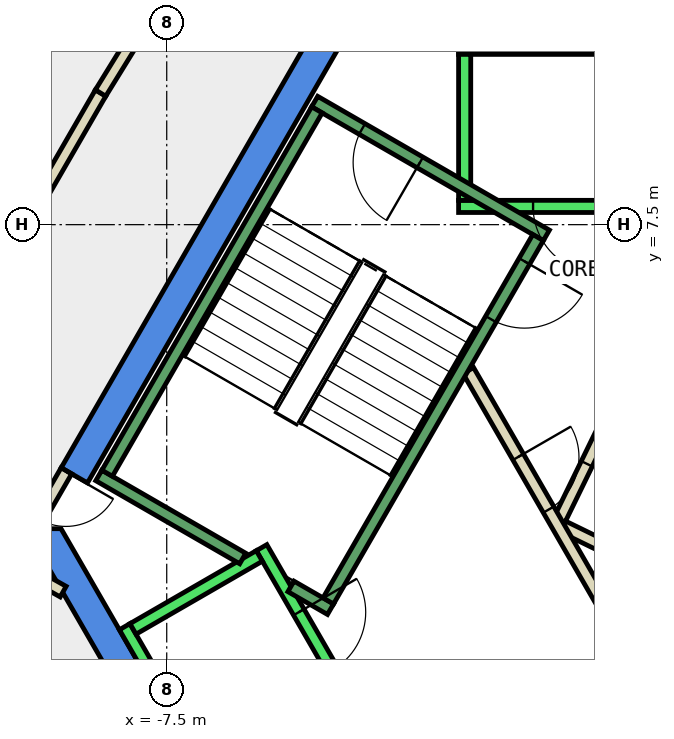
"""IFC4 building model, lengths in metres.
Left out: names, types, materials, properties, quantities, classifications, styles, units other than length and angle.
Written with IfcOpenShell. Run it as: python <this file> out.ifc"""

import sys

from ifc_helpers import new_model, si_unit, direction, frame, frame_2d, origin, place, context, subcontext, project, spatial, polyline, rectangle, outline, extrude, element, fill, save


model = new_model("IFC4")
c1 = context("Model", 3, precision=1e-05, world=origin(), true_north=direction((0.0, 1.0)))
c2 = subcontext(c1, "Body", "Model", "MODEL_VIEW")
j1 = project(units=[si_unit("LENGTHUNIT", "METRE"), si_unit("PLANEANGLEUNIT", "RADIAN")], contexts=[c1])
p1 = place(None, origin())
s1 = spatial("IfcSite", under=j1, at=p1, CompositionType="ELEMENT")
p2 = place(p1, origin())
s2 = spatial("IfcBuilding", under=s1, at=p2, CompositionType="ELEMENT")
p3 = place(p2, frame((0.0, 0.0, 308.0)))
s3 = spatial("IfcBuildingStorey", under=s2, at=p3, CompositionType="ELEMENT", Elevation=308.0)
p4 = place(p3, frame((0.0, 0.0, -0.34)))
e1 = element("IfcWall", 1, at=p4, inside=s3, PredefinedType="SHEAR", context=c2, shape_type="SweptSolid", body=[
    extrude(outline(polyline([(-9.236, 3.502), (-8.803, 3.253), (-4.619, 10.5), (-4.907, 11.0), (-9.236, 3.502)])), origin(), (0.0, 0.0, 1.0), 3.6),
])
p5 = place(p3, frame((0.0, 0.0, -0.34)))
e2 = element("IfcWall", 2, at=p5, inside=s3, PredefinedType="SHEAR", context=c2, shape_type="SweptSolid", body=[
    extrude(outline(polyline([(-9.815, 2.5), (-4.907, -6.0), (-4.619, -5.5), (-9.238, 2.5), (-9.815, 2.5)])), origin(), (0.0, 0.0, 1.0), 3.6),
])
p6 = place(p3, frame((0.285, 5.365, 0.0), z_axis=(0.0, 0.0, 1.0), x_axis=(-0.43840190643, -0.898779043168, 0.0)))
e3 = element("IfcWall", 3, at=p6, inside=s3, PredefinedType="PARTITIONING", context=c2, shape_type="SweptSolid", body=[
    extrude(rectangle(XDim=3.1, YDim=0.2, at=frame_2d((1.55, 0.0))), origin(), (0.0, 0.0, 1.0), 3.26),
])
p7 = place(p6, frame((1.1, 0.0, 0.0)))
e4 = element("IfcOpeningElement", 4, at=p7, cuts=e3, PredefinedType="OPENING", context=c2, shape_type="SweptSolid", body=[
    extrude(rectangle(XDim=0.9, YDim=2.1, at=frame_2d((0.45, 1.05))), frame((0.0, 0.11, 0.0), z_axis=(0.0, -1.0, 0.0), x_axis=(1.0, 0.0, 0.0)), (0.0, 0.0, 1.0), 0.22),
])
p8 = place(p3, frame((-0.984, 2.535, 0.0), z_axis=(0.0, 0.0, 1.0), x_axis=(0.898707583217, -0.438548378025, 0.0)))
e5 = element("IfcWall", 5, at=p8, inside=s3, PredefinedType="PARTITIONING", context=c2, shape_type="SweptSolid", body=[
    extrude(rectangle(XDim=1.774, YDim=0.2, at=frame_2d((0.887, 0.0))), origin(), (0.0, 0.0, 1.0), 3.26),
])
p9 = place(p3, frame((-9.203, 1.465, 0.0), z_axis=(0.0, 0.0, 1.0), x_axis=(-0.872341127106, 0.488897696823, 0.0)))
e6 = element("IfcWall", 6, at=p9, inside=s3, PredefinedType="PARTITIONING", context=c2, shape_type="SweptSolid", body=[
    extrude(rectangle(XDim=1.667, YDim=0.2, at=frame_2d((0.833, 0.0))), origin(), (0.0, 0.0, 1.0), 3.26),
])
p10 = place(p3, frame((-12.701, 2.54, 0.0), z_axis=(0.0, 0.0, 1.0), x_axis=(0.499946799636, 0.86605611685, 0.0)))
e7 = element("IfcWall", 7, at=p10, inside=s3, PredefinedType="PARTITIONING", context=c2, shape_type="SweptSolid", body=[
    extrude(rectangle(XDim=8.227, YDim=0.2, at=frame_2d((4.114, 0.0))), origin(), (0.0, 0.0, 1.0), 3.26),
])
p11 = place(p10, frame((3.613, 0.0, 0.0)))
e8 = element("IfcOpeningElement", 8, at=p11, cuts=e7, PredefinedType="OPENING", context=c2, shape_type="SweptSolid", body=[
    extrude(rectangle(XDim=1.0, YDim=2.1, at=frame_2d((0.5, 1.05))), frame((0.0, 0.11, 0.0), z_axis=(0.0, -1.0, 0.0), x_axis=(1.0, 0.0, 0.0)), (0.0, 0.0, 1.0), 0.22),
])
p12 = place(p3, frame((-8.588, 9.665, 0.0), z_axis=(0.0, 0.0, 1.0), x_axis=(0.525142215688, 0.851014484778, 0.0)))
e9 = element("IfcWall", 9, at=p12, inside=s3, PredefinedType="PARTITIONING", context=c2, shape_type="SweptSolid", body=[
    extrude(rectangle(XDim=7.872, YDim=0.2, at=frame_2d((3.936, 0.0))), origin(), (0.0, 0.0, 1.0), 3.26),
])
p13 = place(p3, frame((-0.982, -1.0, 0.0), z_axis=(0.0, 0.0, 1.0), x_axis=(0.50024047865, 0.865886518847, 0.0)))
e10 = element("IfcWall", 10, at=p13, inside=s3, PredefinedType="PARTITIONING", context=c2, shape_type="SweptSolid", body=[
    extrude(rectangle(XDim=1.863, YDim=0.2, at=frame_2d((0.931, 0.0))), origin(), (0.0, 0.0, 1.0), 3.26),
])
p14 = place(p3, frame((-2.54, 5.1, 0.0), z_axis=(0.0, 0.0, 1.0), x_axis=(0.499925051871, -0.866068670783, 0.0)))
e11 = element("IfcWall", 11, at=p14, inside=s3, PredefinedType="PARTITIONING", context=c2, shape_type="SweptSolid", body=[
    extrude(rectangle(XDim=5.181, YDim=0.2, at=frame_2d((2.59, 0.0))), origin(), (0.0, 0.0, 1.0), 3.26),
])
p15 = place(p14, frame((1.64, 0.0, 0.0)))
e12 = element("IfcOpeningElement", 12, at=p15, cuts=e11, PredefinedType="OPENING", context=c2, shape_type="SweptSolid", body=[
    extrude(rectangle(XDim=1.0, YDim=2.1, at=frame_2d((0.5, 1.05))), frame((0.0, 0.11, 0.0), z_axis=(0.0, -1.0, 0.0), x_axis=(1.0, 0.0, 0.0)), (0.0, 0.0, 1.0), 0.22),
])
p16 = place(p3, frame((-9.15, 3.452, 0.0), z_axis=(0.0, 0.0, 1.0), x_axis=(-0.500079945886, -0.865979242085, 0.0)))
e13 = element("IfcWall", 13, at=p16, inside=s3, PredefinedType="PARTITIONING", context=c2, shape_type="SweptSolid", body=[
    extrude(rectangle(XDim=0.926, YDim=0.2, at=frame_2d((0.463, 0.0))), origin(), (0.0, 0.0, 1.0), 2.4),
])
p17 = place(p16, frame((0.017, 0.0, 0.0)))
e14 = element("IfcOpeningElement", 14, at=p17, cuts=e13, PredefinedType="OPENING", context=c2, shape_type="SweptSolid", body=[
    extrude(rectangle(XDim=0.9, YDim=2.1, at=frame_2d((0.45, 1.05))), frame((0.0, 0.11, 0.0), z_axis=(0.0, -1.0, 0.0), x_axis=(1.0, 0.0, 0.0)), (0.0, 0.0, 1.0), 0.22),
])
p18 = place(p3, frame((2.7, 7.8, 0.0), z_axis=(0.0, 0.0, 1.0), x_axis=(-1.0, 0.0, 0.0)))
e15 = element("IfcWall", 15, at=p18, inside=s3, PredefinedType="STANDARD", context=c2, shape_type="SweptSolid", body=[
    extrude(rectangle(XDim=5.4, YDim=0.2, at=frame_2d((2.7, 0.0))), origin(), (0.0, 0.0, 1.0), 3.26),
])
p19 = place(p18, frame((1.225, 0.0, 0.0)))
e16 = element("IfcOpeningElement", 16, at=p19, cuts=e15, PredefinedType="OPENING", context=c2, shape_type="SweptSolid", body=[
    extrude(rectangle(XDim=1.1, YDim=2.1, at=frame_2d((0.55, 1.05))), frame((0.0, 0.11, 0.0), z_axis=(0.0, -1.0, 0.0), x_axis=(1.0, 0.0, 0.0)), (0.0, 0.0, 1.0), 0.22),
])
p20 = place(p18, frame((3.075, 0.0, 0.0)))
e17 = element("IfcOpeningElement", 17, at=p20, cuts=e15, PredefinedType="OPENING", context=c2, shape_type="SweptSolid", body=[
    extrude(rectangle(XDim=1.1, YDim=2.1, at=frame_2d((0.55, 1.05))), frame((0.0, 0.11, 0.0), z_axis=(0.0, -1.0, 0.0), x_axis=(1.0, 0.0, 0.0)), (0.0, 0.0, 1.0), 0.22),
])
p21 = place(p3, frame((2.7, 10.4, 0.0), z_axis=(0.0, 0.0, 1.0), x_axis=(-1.0, 0.0, 0.0)))
e18 = element("IfcWall", 18, at=p21, inside=s3, PredefinedType="STANDARD", context=c2, shape_type="SweptSolid", body=[
    extrude(rectangle(XDim=5.4, YDim=0.2, at=frame_2d((2.7, 0.0))), origin(), (0.0, 0.0, 1.0), 3.26),
])
p22 = place(p3, frame((-2.6, 7.9, 0.0), z_axis=(0.0, 0.0, 1.0), x_axis=(0.0, 1.0, 0.0)))
e19 = element("IfcWall", 19, at=p22, inside=s3, PredefinedType="STANDARD", context=c2, shape_type="SweptSolid", body=[
    extrude(rectangle(XDim=2.4, YDim=0.2, at=frame_2d((1.2, 0.0))), origin(), (0.0, 0.0, 1.0), 3.26),
])
p23 = place(p3, frame((-5.94, 2.188, 0.0), z_axis=(0.0, 0.0, 1.0), x_axis=(0.500034260056, -0.866005622828, 0.0)))
e20 = element("IfcWall", 20, at=p23, inside=s3, PredefinedType="STANDARD", context=c2, shape_type="SweptSolid", body=[
    extrude(rectangle(XDim=5.399, YDim=0.2, at=frame_2d((2.7, 0.0))), origin(), (0.0, 0.0, 1.0), 3.26),
])
p24 = place(p23, frame((3.075, 0.0, 0.0)))
e21 = element("IfcOpeningElement", 21, at=p24, cuts=e20, PredefinedType="OPENING", context=c2, shape_type="SweptSolid", body=[
    extrude(rectangle(XDim=1.1, YDim=2.1, at=frame_2d((0.55, 1.05))), frame((0.0, 0.11, 0.0), z_axis=(0.0, -1.0, 0.0), x_axis=(1.0, 0.0, 0.0)), (0.0, 0.0, 1.0), 0.22),
])
p25 = place(p23, frame((1.225, 0.0, 0.0)))
e22 = element("IfcOpeningElement", 22, at=p25, cuts=e20, PredefinedType="OPENING", context=c2, shape_type="SweptSolid", body=[
    extrude(rectangle(XDim=1.1, YDim=2.1, at=frame_2d((0.55, 1.05))), frame((0.0, 0.11, 0.0), z_axis=(0.0, -1.0, 0.0), x_axis=(1.0, 0.0, 0.0)), (0.0, 0.0, 1.0), 0.22),
])
p26 = place(p3, frame((-8.192, 0.888, 0.0), z_axis=(0.0, 0.0, 1.0), x_axis=(0.500034260056, -0.866005622828, 0.0)))
e23 = element("IfcWall", 23, at=p26, inside=s3, PredefinedType="STANDARD", context=c2, shape_type="SweptSolid", body=[
    extrude(rectangle(XDim=5.399, YDim=0.2, at=frame_2d((2.7, 0.0))), origin(), (0.0, 0.0, 1.0), 3.26),
])
p27 = place(p3, frame((-5.977, 2.052, 0.0), z_axis=(0.0, 0.0, 1.0), x_axis=(-0.865973769406, -0.500089422704, 0.0)))
e24 = element("IfcWall", 24, at=p27, inside=s3, PredefinedType="STANDARD", context=c2, shape_type="SweptSolid", body=[
    extrude(rectangle(XDim=2.399, YDim=0.2, at=frame_2d((1.2, 0.0))), origin(), (0.0, 0.0, 1.0), 3.26),
])
p28 = place(p3, frame((-1.256, 7.324, 0.0), z_axis=(0.0, 0.0, 1.0), x_axis=(-0.866046073146, 0.499964197906, 0.0)))
e25 = element("IfcWall", 25, at=p28, inside=s3, PredefinedType="STANDARD", context=c2, shape_type="SweptSolid", body=[
    extrude(rectangle(XDim=4.4, YDim=0.2, at=frame_2d((2.2, 0.0))), origin(), (0.0, 0.0, 1.0), 3.26),
])
p29 = place(p28, frame((2.4, 0.0, 0.0)))
e26 = element("IfcOpeningElement", 26, at=p29, cuts=e25, PredefinedType="OPENING", context=c2, shape_type="SweptSolid", body=[
    extrude(rectangle(XDim=1.1, YDim=2.2, at=frame_2d((0.55, 1.1))), frame((0.0, 0.11, 0.0), z_axis=(0.0, -1.0, 0.0), x_axis=(1.0, 0.0, 0.0)), (0.0, 0.0, 1.0), 0.22),
])
p30 = place(p3, frame((-6.25, 2.01, 0.0), z_axis=(0.0, 0.0, 1.0), x_axis=(-0.86611865017, 0.499838457731, 0.0)))
e27 = element("IfcWall", 27, at=p30, inside=s3, PredefinedType="STANDARD", context=c2, shape_type="SweptSolid", body=[
    extrude(rectangle(XDim=2.733, YDim=0.2, at=frame_2d((1.366, 0.0))), origin(), (0.0, 0.0, 1.0), 3.26),
])
p31 = place(p3, frame((-4.806, 1.176, 0.0), z_axis=(0.0, 0.0, 1.0), x_axis=(-0.866558586415, 0.499075361355, 0.0)))
e28 = element("IfcWall", 28, at=p31, inside=s3, PredefinedType="STANDARD", context=c2, shape_type="SweptSolid", body=[
    extrude(rectangle(XDim=0.751, YDim=0.2, at=frame_2d((0.376, 0.0))), origin(), (0.0, 0.0, 1.0), 3.26),
])
p32 = place(p3, frame((-1.393, 7.288, 0.0), z_axis=(0.0, 0.0, 1.0), x_axis=(-0.499963383562, -0.866046543262, 0.0)))
e29 = element("IfcWall", 29, at=p32, inside=s3, PredefinedType="STANDARD", context=c2, shape_type="SweptSolid", body=[
    extrude(rectangle(XDim=6.9, YDim=0.2, at=frame_2d((3.45, 0.0))), origin(), (0.0, 0.0, 1.0), 3.26),
])
p33 = place(p32, frame((0.45, 0.0, 0.0)))
e30 = element("IfcOpeningElement", 30, at=p33, cuts=e29, PredefinedType="OPENING", context=c2, shape_type="SweptSolid", body=[
    extrude(rectangle(XDim=1.1, YDim=2.2, at=frame_2d((0.55, 1.1))), frame((0.0, 0.11, 0.0), z_axis=(0.0, -1.0, 0.0), x_axis=(1.0, 0.0, 0.0)), (0.0, 0.0, 1.0), 0.22),
])
p34 = place(p3, frame((-5.03, 9.388, 0.0), z_axis=(0.0, 0.0, 1.0), x_axis=(-0.499978703459, -0.866037698999, 0.0)))
e31 = element("IfcWall", 31, at=p34, inside=s3, PredefinedType="STANDARD", context=c2, shape_type="SweptSolid", body=[
    extrude(rectangle(XDim=6.9, YDim=0.2, at=frame_2d((3.45, 0.0))), origin(), (0.0, 0.0, 1.0), 3.26),
])
p35 = place(p15, origin())
e32 = element("IfcDoor", 32, at=p35, inside=s3, OperationType="SINGLE_SWING_RIGHT", PredefinedType="DOOR", context=c2, shape_type="SweptSolid", body=[
    extrude(rectangle(XDim=1.0, YDim=2.1, at=frame_2d((0.5, 1.05))), frame((0.0, 0.025, 0.0), z_axis=(0.0, -1.0, 0.0), x_axis=(1.0, 0.0, 0.0)), (0.0, 0.0, 1.0), 0.05),
])
fill(e12, e32)
p36 = place(p7, origin())
e33 = element("IfcDoor", 33, at=p36, inside=s3, OperationType="SINGLE_SWING_RIGHT", PredefinedType="DOOR", context=c2, shape_type="SweptSolid", body=[
    extrude(rectangle(XDim=0.9, YDim=2.1, at=frame_2d((0.45, 1.05))), frame((0.0, 0.025, 0.0), z_axis=(0.0, -1.0, 0.0), x_axis=(1.0, 0.0, 0.0)), (0.0, 0.0, 1.0), 0.05),
])
fill(e4, e33)
p37 = place(p17, origin())
e34 = element("IfcDoor", 34, at=p37, inside=s3, OperationType="SINGLE_SWING_LEFT", PredefinedType="DOOR", context=c2, shape_type="SweptSolid", body=[
    extrude(rectangle(XDim=0.9, YDim=2.1, at=frame_2d((0.45, 1.05))), frame((0.0, 0.025, 0.0), z_axis=(0.0, -1.0, 0.0), x_axis=(1.0, 0.0, 0.0)), (0.0, 0.0, 1.0), 0.05),
])
fill(e14, e34)
p38 = place(p20, origin())
e35 = element("IfcDoor", 35, at=p38, inside=s3, OperationType="SLIDING_TO_LEFT", PredefinedType="DOOR", context=c2, shape_type="SweptSolid", body=[
    extrude(rectangle(XDim=1.1, YDim=2.1, at=frame_2d((0.55, 1.05))), frame((0.0, 0.025, 0.0), z_axis=(0.0, -1.0, 0.0), x_axis=(1.0, 0.0, 0.0)), (0.0, 0.0, 1.0), 0.05),
])
fill(e17, e35)
p39 = place(p25, origin())
e36 = element("IfcDoor", 36, at=p39, inside=s3, OperationType="SLIDING_TO_LEFT", PredefinedType="DOOR", context=c2, shape_type="SweptSolid", body=[
    extrude(rectangle(XDim=1.1, YDim=2.1, at=frame_2d((0.55, 1.05))), frame((0.0, 0.025, 0.0), z_axis=(0.0, -1.0, 0.0), x_axis=(1.0, 0.0, 0.0)), (0.0, 0.0, 1.0), 0.05),
])
fill(e22, e36)
p40 = place(p33, origin())
e37 = element("IfcDoor", 37, at=p40, inside=s3, OperationType="SINGLE_SWING_LEFT", PredefinedType="DOOR", context=c2, shape_type="SweptSolid", body=[
    extrude(rectangle(XDim=1.1, YDim=2.2, at=frame_2d((0.55, 1.1))), frame((0.0, 0.025, 0.0), z_axis=(0.0, -1.0, 0.0), x_axis=(1.0, 0.0, 0.0)), (0.0, 0.0, 1.0), 0.05),
])
fill(e30, e37)
p41 = place(p29, origin())
e38 = element("IfcDoor", 38, at=p41, inside=s3, OperationType="SINGLE_SWING_LEFT", PredefinedType="DOOR", context=c2, shape_type="SweptSolid", body=[
    extrude(rectangle(XDim=1.1, YDim=2.2, at=frame_2d((0.55, 1.1))), frame((0.0, 0.025, 0.0), z_axis=(0.0, -1.0, 0.0), x_axis=(1.0, 0.0, 0.0)), (0.0, 0.0, 1.0), 0.05),
])
fill(e26, e38)
save(model, sys.argv[1])
